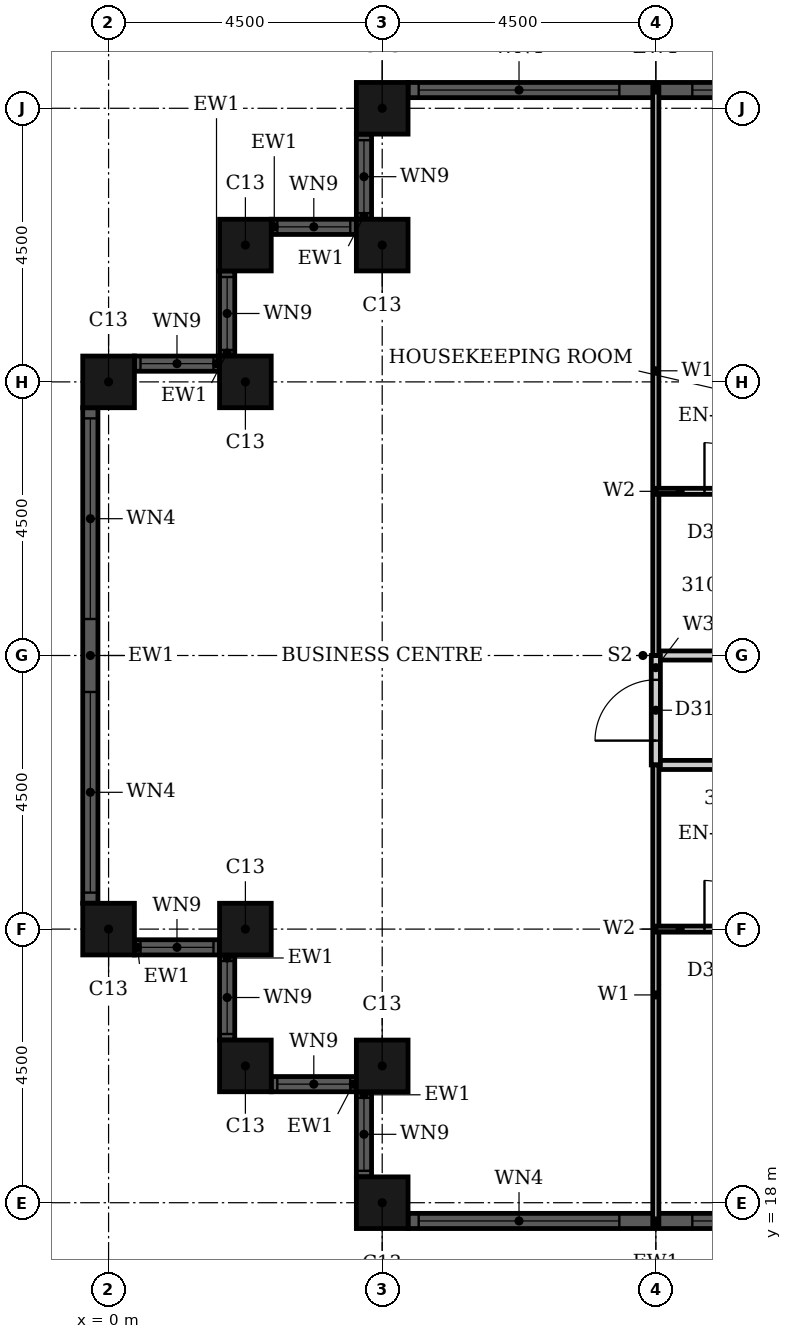
"""IFC4 building model, lengths in metres.
Left out: names, types, materials, properties, quantities, classifications, styles, units other than length and angle.
Written with IfcOpenShell. Run it as: python <this file> out.ifc"""

import sys

from ifc_helpers import new_model, si_unit, direction, frame, frame_2d, origin, origin_2d, place, context, subcontext, project, spatial, rectangle, hollow_rectangle, extrude, element, fill, save


model = new_model("IFC4")
c1 = context("Model", 3, precision=1e-05, world=origin(), true_north=direction((0.0, 1.0)))
c2 = subcontext(c1, "Body", "Model", "MODEL_VIEW")
j1 = project(units=[si_unit("LENGTHUNIT", "METRE"), si_unit("PLANEANGLEUNIT", "RADIAN")], contexts=[c1])
p1 = place(None, origin())
s1 = spatial("IfcSite", under=j1, at=p1, CompositionType="ELEMENT")
p2 = place(p1, origin())
s2 = spatial("IfcBuilding", under=s1, at=p2, CompositionType="ELEMENT")
p3 = place(p2, frame((0.0, 0.0, 126.0)))
s3 = spatial("IfcBuildingStorey", under=s2, at=p3, CompositionType="ELEMENT", Elevation=126.0)
for number, where, z_axis, x_axis in (
    (1, (4.5, 36.0, 0.0), (0.0, 0.0, 1.0), (1.0, 0.0, 0.0)),
    (2, (4.5, 33.75, 0.0), (0.0, 0.0, 1.0), (1.0, 0.0, 0.0)),
    (3, (2.25, 33.75, 0.0), (0.0, 0.0, 1.0), (1.0, 0.0, 0.0)),
    (4, (2.25, 31.5, 0.0), (0.0, 0.0, 1.0), (1.0, 0.0, 0.0)),
    (5, (0.0, 31.5, 0.0), (0.0, 0.0, 1.0), (1.0, 0.0, 0.0)),
    (6, (0.0, 22.5, 0.0), (0.0, 0.0, 1.0), (1.0, 0.0, 0.0)),
    (7, (2.25, 22.5, 0.0), (0.0, 0.0, 1.0), (1.0, 0.0, 0.0)),
    (8, (2.25, 20.25, 0.0), (0.0, 0.0, 1.0), (1.0, 0.0, 0.0)),
    (9, (4.5, 20.25, 0.0), (0.0, 0.0, 1.0), (1.0, 0.0, 0.0)),
    (10, (4.5, 18.0, 0.0), (0.0, 0.0, 1.0), (1.0, 0.0, 0.0)),
):
    element("IfcColumn", number, at=place(p3, frame(where, z_axis=z_axis, x_axis=x_axis)), inside=s3, PredefinedType="COLUMN", context=c2, shape_type="SweptSolid", body=[
        extrude(hollow_rectangle(XDim=0.85, YDim=0.85, WallThickness=0.026, at=origin_2d()), origin(), (0.0, 0.0, 1.0), 3.6),
    ])
p4 = place(p3, frame((13.075, 36.3, 0.0), z_axis=(0.0, 0.0, 1.0), x_axis=(-1.0, 0.0, 0.0)))
e11 = element("IfcWall", 11, at=p4, inside=s3, PredefinedType="SOLIDWALL", context=c2, shape_type="SweptSolid", body=[
    extrude(rectangle(XDim=8.15, YDim=0.25, at=frame_2d((4.075, 0.0))), origin(), (0.0, 0.0, 1.0), 3.6),
])
p5 = place(p4, frame((0.175, 0.0, 0.9)))
e12 = element("IfcOpeningElement", 12, at=p5, cuts=e11, PredefinedType="OPENING", context=c2, shape_type="SweptSolid", body=[
    extrude(rectangle(XDim=3.3, YDim=2.08, at=frame_2d((1.65, 1.04))), frame((0.0, 0.135, 0.0), z_axis=(0.0, -1.0, 0.0), x_axis=(1.0, 0.0, 0.0)), (0.0, 0.0, 1.0), 0.27),
])
p6 = place(p4, frame((4.675, 0.0, 0.9)))
e13 = element("IfcOpeningElement", 13, at=p6, cuts=e11, PredefinedType="OPENING", context=c2, shape_type="SweptSolid", body=[
    extrude(rectangle(XDim=3.3, YDim=2.08, at=frame_2d((1.65, 1.04))), frame((0.0, 0.135, 0.0), z_axis=(0.0, -1.0, 0.0), x_axis=(1.0, 0.0, 0.0)), (0.0, 0.0, 1.0), 0.27),
])
p7 = place(p3, frame((4.2, 35.575, 0.0), z_axis=(0.0, 0.0, 1.0), x_axis=(0.0, -1.0, 0.0)))
e14 = element("IfcWall", 14, at=p7, inside=s3, PredefinedType="SOLIDWALL", context=c2, shape_type="SweptSolid", body=[
    extrude(rectangle(XDim=1.4, YDim=0.25, at=frame_2d((0.7, 0.0))), origin(), (0.0, 0.0, 1.0), 3.6),
])
p8 = place(p7, frame((0.1, 0.0, 0.9)))
e15 = element("IfcOpeningElement", 15, at=p8, cuts=e14, PredefinedType="OPENING", context=c2, shape_type="SweptSolid", body=[
    extrude(rectangle(XDim=1.2, YDim=2.08, at=frame_2d((0.6, 1.04))), frame((0.0, 0.135, 0.0), z_axis=(0.0, -1.0, 0.0), x_axis=(1.0, 0.0, 0.0)), (0.0, 0.0, 1.0), 0.27),
])
p9 = place(p3, frame((4.075, 34.05, 0.0), z_axis=(0.0, 0.0, 1.0), x_axis=(-1.0, 0.0, 0.0)))
e16 = element("IfcWall", 16, at=p9, inside=s3, PredefinedType="SOLIDWALL", context=c2, shape_type="SweptSolid", body=[
    extrude(rectangle(XDim=1.4, YDim=0.25, at=frame_2d((0.7, 0.0))), origin(), (0.0, 0.0, 1.0), 3.6),
])
p10 = place(p9, frame((0.1, 0.0, 0.9)))
e17 = element("IfcOpeningElement", 17, at=p10, cuts=e16, PredefinedType="OPENING", context=c2, shape_type="SweptSolid", body=[
    extrude(rectangle(XDim=1.2, YDim=2.08, at=frame_2d((0.6, 1.04))), frame((0.0, 0.135, 0.0), z_axis=(0.0, -1.0, 0.0), x_axis=(1.0, 0.0, 0.0)), (0.0, 0.0, 1.0), 0.27),
])
p11 = place(p3, frame((1.95, 33.325, 0.0), z_axis=(0.0, 0.0, 1.0), x_axis=(0.0, -1.0, 0.0)))
e18 = element("IfcWall", 18, at=p11, inside=s3, PredefinedType="SOLIDWALL", context=c2, shape_type="SweptSolid", body=[
    extrude(rectangle(XDim=1.4, YDim=0.25, at=frame_2d((0.7, 0.0))), origin(), (0.0, 0.0, 1.0), 3.6),
])
p12 = place(p11, frame((0.1, 0.0, 0.9)))
e19 = element("IfcOpeningElement", 19, at=p12, cuts=e18, PredefinedType="OPENING", context=c2, shape_type="SweptSolid", body=[
    extrude(rectangle(XDim=1.2, YDim=2.08, at=frame_2d((0.6, 1.04))), frame((0.0, 0.135, 0.0), z_axis=(0.0, -1.0, 0.0), x_axis=(1.0, 0.0, 0.0)), (0.0, 0.0, 1.0), 0.27),
])
p13 = place(p3, frame((1.825, 31.8, 0.0), z_axis=(0.0, 0.0, 1.0), x_axis=(-1.0, 0.0, 0.0)))
e20 = element("IfcWall", 20, at=p13, inside=s3, PredefinedType="SOLIDWALL", context=c2, shape_type="SweptSolid", body=[
    extrude(rectangle(XDim=1.4, YDim=0.25, at=frame_2d((0.7, 0.0))), origin(), (0.0, 0.0, 1.0), 3.6),
])
p14 = place(p13, frame((0.1, 0.0, 0.9)))
e21 = element("IfcOpeningElement", 21, at=p14, cuts=e20, PredefinedType="OPENING", context=c2, shape_type="SweptSolid", body=[
    extrude(rectangle(XDim=1.2, YDim=2.08, at=frame_2d((0.6, 1.04))), frame((0.0, 0.135, 0.0), z_axis=(0.0, -1.0, 0.0), x_axis=(1.0, 0.0, 0.0)), (0.0, 0.0, 1.0), 0.27),
])
p15 = place(p3, frame((-0.3, 31.075, 0.0), z_axis=(0.0, 0.0, 1.0), x_axis=(0.0, -1.0, 0.0)))
e22 = element("IfcWall", 22, at=p15, inside=s3, PredefinedType="SOLIDWALL", context=c2, shape_type="SweptSolid", body=[
    extrude(rectangle(XDim=8.15, YDim=0.25, at=frame_2d((4.075, 0.0))), origin(), (0.0, 0.0, 1.0), 3.6),
])
p16 = place(p15, frame((0.175, 0.0, 0.9)))
e23 = element("IfcOpeningElement", 23, at=p16, cuts=e22, PredefinedType="OPENING", context=c2, shape_type="SweptSolid", body=[
    extrude(rectangle(XDim=3.3, YDim=2.08, at=frame_2d((1.65, 1.04))), frame((0.0, 0.135, 0.0), z_axis=(0.0, -1.0, 0.0), x_axis=(1.0, 0.0, 0.0)), (0.0, 0.0, 1.0), 0.27),
])
p17 = place(p15, frame((4.675, 0.0, 0.9)))
e24 = element("IfcOpeningElement", 24, at=p17, cuts=e22, PredefinedType="OPENING", context=c2, shape_type="SweptSolid", body=[
    extrude(rectangle(XDim=3.3, YDim=2.08, at=frame_2d((1.65, 1.04))), frame((0.0, 0.135, 0.0), z_axis=(0.0, -1.0, 0.0), x_axis=(1.0, 0.0, 0.0)), (0.0, 0.0, 1.0), 0.27),
])
p18 = place(p3, frame((0.425, 22.2, 0.0), z_axis=(0.0, 0.0, 1.0), x_axis=(1.0, 0.0, 0.0)))
e25 = element("IfcWall", 25, at=p18, inside=s3, PredefinedType="SOLIDWALL", context=c2, shape_type="SweptSolid", body=[
    extrude(rectangle(XDim=1.4, YDim=0.25, at=frame_2d((0.7, 0.0))), origin(), (0.0, 0.0, 1.0), 3.6),
])
p19 = place(p18, frame((0.1, 0.0, 0.9)))
e26 = element("IfcOpeningElement", 26, at=p19, cuts=e25, PredefinedType="OPENING", context=c2, shape_type="SweptSolid", body=[
    extrude(rectangle(XDim=1.2, YDim=2.08, at=frame_2d((0.6, 1.04))), frame((0.0, 0.135, 0.0), z_axis=(0.0, -1.0, 0.0), x_axis=(1.0, 0.0, 0.0)), (0.0, 0.0, 1.0), 0.27),
])
p20 = place(p3, frame((1.95, 22.075, 0.0), z_axis=(0.0, 0.0, 1.0), x_axis=(0.0, -1.0, 0.0)))
e27 = element("IfcWall", 27, at=p20, inside=s3, PredefinedType="SOLIDWALL", context=c2, shape_type="SweptSolid", body=[
    extrude(rectangle(XDim=1.4, YDim=0.25, at=frame_2d((0.7, 0.0))), origin(), (0.0, 0.0, 1.0), 3.6),
])
p21 = place(p20, frame((0.1, 0.0, 0.9)))
e28 = element("IfcOpeningElement", 28, at=p21, cuts=e27, PredefinedType="OPENING", context=c2, shape_type="SweptSolid", body=[
    extrude(rectangle(XDim=1.2, YDim=2.08, at=frame_2d((0.6, 1.04))), frame((0.0, 0.135, 0.0), z_axis=(0.0, -1.0, 0.0), x_axis=(1.0, 0.0, 0.0)), (0.0, 0.0, 1.0), 0.27),
])
p22 = place(p3, frame((2.675, 19.95, 0.0), z_axis=(0.0, 0.0, 1.0), x_axis=(1.0, 0.0, 0.0)))
e29 = element("IfcWall", 29, at=p22, inside=s3, PredefinedType="SOLIDWALL", context=c2, shape_type="SweptSolid", body=[
    extrude(rectangle(XDim=1.4, YDim=0.25, at=frame_2d((0.7, 0.0))), origin(), (0.0, 0.0, 1.0), 3.6),
])
p23 = place(p22, frame((0.1, 0.0, 0.9)))
e30 = element("IfcOpeningElement", 30, at=p23, cuts=e29, PredefinedType="OPENING", context=c2, shape_type="SweptSolid", body=[
    extrude(rectangle(XDim=1.2, YDim=2.08, at=frame_2d((0.6, 1.04))), frame((0.0, 0.135, 0.0), z_axis=(0.0, -1.0, 0.0), x_axis=(1.0, 0.0, 0.0)), (0.0, 0.0, 1.0), 0.27),
])
p24 = place(p3, frame((4.2, 19.825, 0.0), z_axis=(0.0, 0.0, 1.0), x_axis=(0.0, -1.0, 0.0)))
e31 = element("IfcWall", 31, at=p24, inside=s3, PredefinedType="SOLIDWALL", context=c2, shape_type="SweptSolid", body=[
    extrude(rectangle(XDim=1.4, YDim=0.25, at=frame_2d((0.7, 0.0))), origin(), (0.0, 0.0, 1.0), 3.6),
])
p25 = place(p24, frame((0.1, 0.0, 0.9)))
e32 = element("IfcOpeningElement", 32, at=p25, cuts=e31, PredefinedType="OPENING", context=c2, shape_type="SweptSolid", body=[
    extrude(rectangle(XDim=1.2, YDim=2.08, at=frame_2d((0.6, 1.04))), frame((0.0, 0.135, 0.0), z_axis=(0.0, -1.0, 0.0), x_axis=(1.0, 0.0, 0.0)), (0.0, 0.0, 1.0), 0.27),
])
p26 = place(p3, frame((4.925, 17.7, 0.0), z_axis=(0.0, 0.0, 1.0), x_axis=(1.0, 0.0, 0.0)))
e33 = element("IfcWall", 33, at=p26, inside=s3, PredefinedType="SOLIDWALL", context=c2, shape_type="SweptSolid", body=[
    extrude(rectangle(XDim=8.15, YDim=0.25, at=frame_2d((4.075, 0.0))), origin(), (0.0, 0.0, 1.0), 3.6),
])
p27 = place(p26, frame((0.175, 0.0, 0.9)))
e34 = element("IfcOpeningElement", 34, at=p27, cuts=e33, PredefinedType="OPENING", context=c2, shape_type="SweptSolid", body=[
    extrude(rectangle(XDim=3.3, YDim=2.08, at=frame_2d((1.65, 1.04))), frame((0.0, 0.135, 0.0), z_axis=(0.0, -1.0, 0.0), x_axis=(1.0, 0.0, 0.0)), (0.0, 0.0, 1.0), 0.27),
])
p28 = place(p26, frame((4.675, 0.0, 0.9)))
e35 = element("IfcOpeningElement", 35, at=p28, cuts=e33, PredefinedType="OPENING", context=c2, shape_type="SweptSolid", body=[
    extrude(rectangle(XDim=3.3, YDim=2.08, at=frame_2d((1.65, 1.04))), frame((0.0, 0.135, 0.0), z_axis=(0.0, -1.0, 0.0), x_axis=(1.0, 0.0, 0.0)), (0.0, 0.0, 1.0), 0.27),
])
p29 = place(p3, frame((9.0, 25.2, 0.0), z_axis=(0.0, 0.0, 1.0), x_axis=(1.0, 0.0, 0.0)))
e36 = element("IfcWall", 36, at=p29, inside=s3, PredefinedType="PARTITIONING", context=c2, shape_type="SweptSolid", body=[
    extrude(rectangle(XDim=7.2, YDim=0.15, at=frame_2d((3.6, 0.0))), origin(), (0.0, 0.0, 1.0), 3.3),
])
p30 = place(p29, frame((2.95, 0.0, 0.0)))
e37 = element("IfcOpeningElement", 37, at=p30, cuts=e36, PredefinedType="OPENING", context=c2, shape_type="SweptSolid", body=[
    extrude(rectangle(XDim=1.0, YDim=2.1, at=frame_2d((0.5, 1.05))), frame((0.0, 0.085, 0.0), z_axis=(0.0, -1.0, 0.0), x_axis=(1.0, 0.0, 0.0)), (0.0, 0.0, 1.0), 0.17),
])
p31 = place(p3, frame((9.0, 27.0, 0.0), z_axis=(0.0, 0.0, 1.0), x_axis=(1.0, 0.0, 0.0)))
e38 = element("IfcWall", 38, at=p31, inside=s3, PredefinedType="PARTITIONING", context=c2, shape_type="SweptSolid", body=[
    extrude(rectangle(XDim=7.2, YDim=0.15, at=frame_2d((3.6, 0.0))), origin(), (0.0, 0.0, 1.0), 2.58),
])
p32 = place(p31, frame((2.95, 0.0, 0.0)))
e39 = element("IfcOpeningElement", 39, at=p32, cuts=e38, PredefinedType="OPENING", context=c2, shape_type="SweptSolid", body=[
    extrude(rectangle(XDim=1.0, YDim=2.1, at=frame_2d((0.5, 1.05))), frame((0.0, 0.085, 0.0), z_axis=(0.0, -1.0, 0.0), x_axis=(1.0, 0.0, 0.0)), (0.0, 0.0, 1.0), 0.17),
])
p33 = place(p3, frame((9.0, 25.2, 0.0), z_axis=(0.0, 0.0, 1.0), x_axis=(0.0, 1.0, 0.0)))
e40 = element("IfcWall", 40, at=p33, inside=s3, PredefinedType="PARTITIONING", context=c2, shape_type="SweptSolid", body=[
    extrude(rectangle(XDim=1.8, YDim=0.15, at=frame_2d((0.9, 0.0))), origin(), (0.0, 0.0, 1.0), 3.3),
])
p34 = place(p33, frame((0.4, 0.0, 0.0)))
e41 = element("IfcOpeningElement", 41, at=p34, cuts=e40, PredefinedType="OPENING", context=c2, shape_type="SweptSolid", body=[
    extrude(rectangle(XDim=1.0, YDim=2.1, at=frame_2d((0.5, 1.05))), frame((0.0, 0.085, 0.0), z_axis=(0.0, -1.0, 0.0), x_axis=(1.0, 0.0, 0.0)), (0.0, 0.0, 1.0), 0.17),
])
p35 = place(p3, frame((9.0, 27.0, 0.0), z_axis=(0.0, 0.0, 1.0), x_axis=(0.0, 1.0, 0.0)))
e42 = element("IfcWall", 42, at=p35, inside=s3, PredefinedType="PARTITIONING", context=c2, shape_type="SweptSolid", body=[
    extrude(rectangle(XDim=9.365, YDim=0.1, at=frame_2d((4.683, 0.0))), origin(), (0.0, 0.0, 1.0), 3.3),
])
p36 = place(p3, frame((9.0, 17.635, 0.0), z_axis=(0.0, 0.0, 1.0), x_axis=(0.0, 1.0, 0.0)))
e43 = element("IfcWall", 43, at=p36, inside=s3, PredefinedType="PARTITIONING", context=c2, shape_type="SweptSolid", body=[
    extrude(rectangle(XDim=7.565, YDim=0.1, at=frame_2d((3.782, 0.0))), origin(), (0.0, 0.0, 1.0), 3.3),
])
p37 = place(p3, frame((9.0, 22.5, 0.0), z_axis=(0.0, 0.0, 1.0), x_axis=(1.0, 0.0, 0.0)))
e44 = element("IfcWall", 44, at=p37, inside=s3, PredefinedType="PARTITIONING", context=c2, shape_type="SweptSolid", body=[
    extrude(rectangle(XDim=2.4, YDim=0.1, at=frame_2d((1.2, 0.0))), origin(), (0.0, 0.0, 1.0), 2.58),
])
p38 = place(p37, frame((0.8, 0.0, 0.0)))
e45 = element("IfcOpeningElement", 45, at=p38, cuts=e44, PredefinedType="OPENING", context=c2, shape_type="SweptSolid", body=[
    extrude(rectangle(XDim=0.8, YDim=2.1, at=frame_2d((0.4, 1.05))), frame((0.0, 0.06, 0.0), z_axis=(0.0, -1.0, 0.0), x_axis=(1.0, 0.0, 0.0)), (0.0, 0.0, 1.0), 0.12),
])
p39 = place(p3, frame((9.0, 29.7, 0.0), z_axis=(0.0, 0.0, 1.0), x_axis=(1.0, 0.0, 0.0)))
e46 = element("IfcWall", 46, at=p39, inside=s3, PredefinedType="PARTITIONING", context=c2, shape_type="SweptSolid", body=[
    extrude(rectangle(XDim=2.4, YDim=0.1, at=frame_2d((1.2, 0.0))), origin(), (0.0, 0.0, 1.0), 3.3),
])
p40 = place(p39, frame((0.8, 0.0, 0.0)))
e47 = element("IfcOpeningElement", 47, at=p40, cuts=e46, PredefinedType="OPENING", context=c2, shape_type="SweptSolid", body=[
    extrude(rectangle(XDim=0.8, YDim=2.1, at=frame_2d((0.4, 1.05))), frame((0.0, 0.06, 0.0), z_axis=(0.0, -1.0, 0.0), x_axis=(1.0, 0.0, 0.0)), (0.0, 0.0, 1.0), 0.12),
])
p41 = place(p5, origin())
e48 = element("IfcWindow", 48, at=p41, inside=s3, PartitioningType="SINGLE_PANEL", PredefinedType="WINDOW", context=c2, shape_type="SweptSolid", body=[
    extrude(rectangle(XDim=3.3, YDim=2.08, at=frame_2d((1.65, 1.04))), frame((0.0, 0.03, 0.0), z_axis=(0.0, -1.0, 0.0), x_axis=(1.0, 0.0, 0.0)), (0.0, 0.0, 1.0), 0.06),
])
fill(e12, e48)
p42 = place(p6, origin())
e49 = element("IfcWindow", 49, at=p42, inside=s3, PartitioningType="SINGLE_PANEL", PredefinedType="WINDOW", context=c2, shape_type="SweptSolid", body=[
    extrude(rectangle(XDim=3.3, YDim=2.08, at=frame_2d((1.65, 1.04))), frame((0.0, 0.03, 0.0), z_axis=(0.0, -1.0, 0.0), x_axis=(1.0, 0.0, 0.0)), (0.0, 0.0, 1.0), 0.06),
])
fill(e13, e49)
p43 = place(p8, origin())
e50 = element("IfcWindow", 50, at=p43, inside=s3, PartitioningType="SINGLE_PANEL", PredefinedType="WINDOW", context=c2, shape_type="SweptSolid", body=[
    extrude(rectangle(XDim=1.2, YDim=2.08, at=frame_2d((0.6, 1.04))), frame((0.0, 0.03, 0.0), z_axis=(0.0, -1.0, 0.0), x_axis=(1.0, 0.0, 0.0)), (0.0, 0.0, 1.0), 0.06),
])
fill(e15, e50)
p44 = place(p10, origin())
e51 = element("IfcWindow", 51, at=p44, inside=s3, PartitioningType="SINGLE_PANEL", PredefinedType="WINDOW", context=c2, shape_type="SweptSolid", body=[
    extrude(rectangle(XDim=1.2, YDim=2.08, at=frame_2d((0.6, 1.04))), frame((0.0, 0.03, 0.0), z_axis=(0.0, -1.0, 0.0), x_axis=(1.0, 0.0, 0.0)), (0.0, 0.0, 1.0), 0.06),
])
fill(e17, e51)
p45 = place(p12, origin())
e52 = element("IfcWindow", 52, at=p45, inside=s3, PartitioningType="SINGLE_PANEL", PredefinedType="WINDOW", context=c2, shape_type="SweptSolid", body=[
    extrude(rectangle(XDim=1.2, YDim=2.08, at=frame_2d((0.6, 1.04))), frame((0.0, 0.03, 0.0), z_axis=(0.0, -1.0, 0.0), x_axis=(1.0, 0.0, 0.0)), (0.0, 0.0, 1.0), 0.06),
])
fill(e19, e52)
p46 = place(p14, origin())
e53 = element("IfcWindow", 53, at=p46, inside=s3, PartitioningType="SINGLE_PANEL", PredefinedType="WINDOW", context=c2, shape_type="SweptSolid", body=[
    extrude(rectangle(XDim=1.2, YDim=2.08, at=frame_2d((0.6, 1.04))), frame((0.0, 0.03, 0.0), z_axis=(0.0, -1.0, 0.0), x_axis=(1.0, 0.0, 0.0)), (0.0, 0.0, 1.0), 0.06),
])
fill(e21, e53)
p47 = place(p16, origin())
e54 = element("IfcWindow", 54, at=p47, inside=s3, PartitioningType="SINGLE_PANEL", PredefinedType="WINDOW", context=c2, shape_type="SweptSolid", body=[
    extrude(rectangle(XDim=3.3, YDim=2.08, at=frame_2d((1.65, 1.04))), frame((0.0, 0.03, 0.0), z_axis=(0.0, -1.0, 0.0), x_axis=(1.0, 0.0, 0.0)), (0.0, 0.0, 1.0), 0.06),
])
fill(e23, e54)
p48 = place(p17, origin())
e55 = element("IfcWindow", 55, at=p48, inside=s3, PartitioningType="SINGLE_PANEL", PredefinedType="WINDOW", context=c2, shape_type="SweptSolid", body=[
    extrude(rectangle(XDim=3.3, YDim=2.08, at=frame_2d((1.65, 1.04))), frame((0.0, 0.03, 0.0), z_axis=(0.0, -1.0, 0.0), x_axis=(1.0, 0.0, 0.0)), (0.0, 0.0, 1.0), 0.06),
])
fill(e24, e55)
p49 = place(p19, origin())
e56 = element("IfcWindow", 56, at=p49, inside=s3, PartitioningType="SINGLE_PANEL", PredefinedType="WINDOW", context=c2, shape_type="SweptSolid", body=[
    extrude(rectangle(XDim=1.2, YDim=2.08, at=frame_2d((0.6, 1.04))), frame((0.0, 0.03, 0.0), z_axis=(0.0, -1.0, 0.0), x_axis=(1.0, 0.0, 0.0)), (0.0, 0.0, 1.0), 0.06),
])
fill(e26, e56)
p50 = place(p21, origin())
e57 = element("IfcWindow", 57, at=p50, inside=s3, PartitioningType="SINGLE_PANEL", PredefinedType="WINDOW", context=c2, shape_type="SweptSolid", body=[
    extrude(rectangle(XDim=1.2, YDim=2.08, at=frame_2d((0.6, 1.04))), frame((0.0, 0.03, 0.0), z_axis=(0.0, -1.0, 0.0), x_axis=(1.0, 0.0, 0.0)), (0.0, 0.0, 1.0), 0.06),
])
fill(e28, e57)
p51 = place(p23, origin())
e58 = element("IfcWindow", 58, at=p51, inside=s3, PartitioningType="SINGLE_PANEL", PredefinedType="WINDOW", context=c2, shape_type="SweptSolid", body=[
    extrude(rectangle(XDim=1.2, YDim=2.08, at=frame_2d((0.6, 1.04))), frame((0.0, 0.03, 0.0), z_axis=(0.0, -1.0, 0.0), x_axis=(1.0, 0.0, 0.0)), (0.0, 0.0, 1.0), 0.06),
])
fill(e30, e58)
p52 = place(p25, origin())
e59 = element("IfcWindow", 59, at=p52, inside=s3, PartitioningType="SINGLE_PANEL", PredefinedType="WINDOW", context=c2, shape_type="SweptSolid", body=[
    extrude(rectangle(XDim=1.2, YDim=2.08, at=frame_2d((0.6, 1.04))), frame((0.0, 0.03, 0.0), z_axis=(0.0, -1.0, 0.0), x_axis=(1.0, 0.0, 0.0)), (0.0, 0.0, 1.0), 0.06),
])
fill(e32, e59)
p53 = place(p27, origin())
e60 = element("IfcWindow", 60, at=p53, inside=s3, PartitioningType="SINGLE_PANEL", PredefinedType="WINDOW", context=c2, shape_type="SweptSolid", body=[
    extrude(rectangle(XDim=3.3, YDim=2.08, at=frame_2d((1.65, 1.04))), frame((0.0, 0.03, 0.0), z_axis=(0.0, -1.0, 0.0), x_axis=(1.0, 0.0, 0.0)), (0.0, 0.0, 1.0), 0.06),
])
fill(e34, e60)
p54 = place(p28, origin())
e61 = element("IfcWindow", 61, at=p54, inside=s3, PartitioningType="SINGLE_PANEL", PredefinedType="WINDOW", context=c2, shape_type="SweptSolid", body=[
    extrude(rectangle(XDim=3.3, YDim=2.08, at=frame_2d((1.65, 1.04))), frame((0.0, 0.03, 0.0), z_axis=(0.0, -1.0, 0.0), x_axis=(1.0, 0.0, 0.0)), (0.0, 0.0, 1.0), 0.06),
])
fill(e35, e61)
p55 = place(p38, origin())
e62 = element("IfcDoor", 62, at=p55, inside=s3, OperationType="SINGLE_SWING_RIGHT", PredefinedType="DOOR", context=c2, shape_type="SweptSolid", body=[
    extrude(rectangle(XDim=0.8, YDim=2.1, at=frame_2d((0.4, 1.05))), frame((0.0, 0.025, 0.0), z_axis=(0.0, -1.0, 0.0), x_axis=(1.0, 0.0, 0.0)), (0.0, 0.0, 1.0), 0.05),
])
fill(e45, e62)
p56 = place(p40, origin())
e63 = element("IfcDoor", 63, at=p56, inside=s3, OperationType="SINGLE_SWING_RIGHT", PredefinedType="DOOR", context=c2, shape_type="SweptSolid", body=[
    extrude(rectangle(XDim=0.8, YDim=2.1, at=frame_2d((0.4, 1.05))), frame((0.0, 0.025, 0.0), z_axis=(0.0, -1.0, 0.0), x_axis=(1.0, 0.0, 0.0)), (0.0, 0.0, 1.0), 0.05),
])
fill(e47, e63)
p57 = place(p34, origin())
e64 = element("IfcDoor", 64, at=p57, inside=s3, OperationType="SINGLE_SWING_LEFT", PredefinedType="DOOR", context=c2, shape_type="SweptSolid", body=[
    extrude(rectangle(XDim=1.0, YDim=2.1, at=frame_2d((0.5, 1.05))), frame((0.0, 0.025, 0.0), z_axis=(0.0, -1.0, 0.0), x_axis=(1.0, 0.0, 0.0)), (0.0, 0.0, 1.0), 0.05),
])
fill(e41, e64)
save(model, sys.argv[1])
